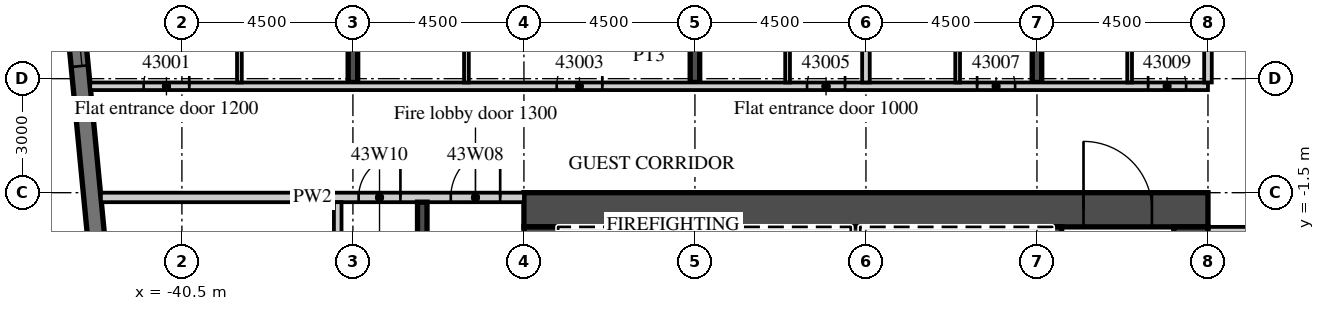
"""IFC4 building model, lengths in metres.
Left out: names, types, materials, properties, quantities, classifications, styles, units other than length and angle.
Written with IfcOpenShell. Run it as: python <this file> out.ifc"""

import sys

from ifc_helpers import new_model, si_unit, direction, frame, frame_2d, origin, place, context, subcontext, project, spatial, rectangle, extrude, element, fill, save


model = new_model("IFC4")
c1 = context("Model", 3, precision=1e-05, world=origin(), true_north=direction((0.0, 1.0)))
c2 = subcontext(c1, "Body", "Model", "MODEL_VIEW")
j1 = project(units=[si_unit("LENGTHUNIT", "METRE"), si_unit("PLANEANGLEUNIT", "RADIAN")], contexts=[c1])
p1 = place(None, origin())
s1 = spatial("IfcSite", under=j1, at=p1, CompositionType="ELEMENT")
p2 = place(p1, origin())
s2 = spatial("IfcBuilding", under=s1, at=p2, CompositionType="ELEMENT")
p3 = place(p2, frame((0.0, 0.0, 183.4)))
s3 = spatial("IfcBuildingStorey", under=s2, at=p3, CompositionType="ELEMENT", Elevation=183.4)
p4 = place(p3, frame((-36.0, 1.4, 0.0), z_axis=(0.0, 0.0, 1.0), x_axis=(0.0, 1.0, 0.0)))
e1 = element("IfcWall", 1, at=p4, inside=s3, PredefinedType="SHEAR", context=c2, shape_type="SweptSolid", body=[
    extrude(rectangle(XDim=15.401, YDim=0.25, at=frame_2d((7.701, 0.0))), origin(), (0.0, 0.0, 1.0), 3.3),
])
p5 = place(p3, frame((-27.0, 1.4, 0.0), z_axis=(0.0, 0.0, 1.0), x_axis=(0.0, 1.0, 0.0)))
e2 = element("IfcWall", 2, at=p5, inside=s3, PredefinedType="SHEAR", context=c2, shape_type="SweptSolid", body=[
    extrude(rectangle(XDim=16.268, YDim=0.25, at=frame_2d((8.134, 0.0))), origin(), (0.0, 0.0, 1.0), 3.3),
])
p6 = place(p3, frame((-18.0, 1.4, 0.0), z_axis=(0.0, 0.0, 1.0), x_axis=(0.0, 1.0, 0.0)))
e3 = element("IfcWall", 3, at=p6, inside=s3, PredefinedType="SHEAR", context=c2, shape_type="SweptSolid", body=[
    extrude(rectangle(XDim=17.134, YDim=0.25, at=frame_2d((8.567, 0.0))), origin(), (0.0, 0.0, 1.0), 3.3),
])
p7 = place(p3, frame((-44.214, 12.466, 0.0), z_axis=(0.0, 0.0, 1.0), x_axis=(0.095847314626, -0.995396047952, 0.0)))
e4 = element("IfcWall", 4, at=p7, inside=s3, PredefinedType="SOLIDWALL", context=c2, shape_type="SweptSolid", body=[
    extrude(rectangle(XDim=34.0, YDim=0.45, at=frame_2d((17.0, 0.0))), origin(), (0.0, 0.0, 1.0), 3.02),
])
p8 = place(p7, frame((2.865, 0.0, 0.45)))
e5 = element("IfcOpeningElement", 5, at=p8, cuts=e4, PredefinedType="OPENING", context=c2, shape_type="SweptSolid", body=[
    extrude(rectangle(XDim=3.3, YDim=2.25, at=frame_2d((1.65, 1.125))), frame((0.0, 0.235, 0.0), z_axis=(0.0, -1.0, 0.0), x_axis=(1.0, 0.0, 0.0)), (0.0, 0.0, 1.0), 0.47),
])
p9 = place(p7, frame((7.386, 0.0, 0.45)))
e6 = element("IfcOpeningElement", 6, at=p9, cuts=e4, PredefinedType="OPENING", context=c2, shape_type="SweptSolid", body=[
    extrude(rectangle(XDim=3.3, YDim=2.25, at=frame_2d((1.65, 1.125))), frame((0.0, 0.235, 0.0), z_axis=(0.0, -1.0, 0.0), x_axis=(1.0, 0.0, 0.0)), (0.0, 0.0, 1.0), 0.47),
])
p10 = place(p3, frame((-42.913, 1.3, 0.0), z_axis=(0.0, 0.0, 1.0), x_axis=(1.0, 0.0, 0.0)))
e7 = element("IfcWall", 7, at=p10, inside=s3, PredefinedType="PARTITIONING", context=c2, shape_type="SweptSolid", body=[
    extrude(rectangle(XDim=29.413, YDim=0.2, at=frame_2d((14.707, 0.0))), origin(), (0.0, 0.0, 1.0), 3.02),
])
p11 = place(p10, frame((1.406, 0.0, 0.0)))
e8 = element("IfcOpeningElement", 8, at=p11, cuts=e7, PredefinedType="OPENING", context=c2, shape_type="SweptSolid", body=[
    extrude(rectangle(XDim=1.2, YDim=2.1, at=frame_2d((0.6, 1.05))), frame((0.0, 0.11, 0.0), z_axis=(0.0, -1.0, 0.0), x_axis=(1.0, 0.0, 0.0)), (0.0, 0.0, 1.0), 0.22),
])
p12 = place(p10, frame((12.275, 0.0, 0.0)))
e9 = element("IfcOpeningElement", 9, at=p12, cuts=e7, PredefinedType="OPENING", context=c2, shape_type="SweptSolid", body=[
    extrude(rectangle(XDim=1.2, YDim=2.1, at=frame_2d((0.6, 1.05))), frame((0.0, 0.11, 0.0), z_axis=(0.0, -1.0, 0.0), x_axis=(1.0, 0.0, 0.0)), (0.0, 0.0, 1.0), 0.22),
])
p13 = place(p10, frame((18.863, 0.0, 0.0)))
e10 = element("IfcOpeningElement", 10, at=p13, cuts=e7, PredefinedType="OPENING", context=c2, shape_type="SweptSolid", body=[
    extrude(rectangle(XDim=1.0, YDim=2.1, at=frame_2d((0.5, 1.05))), frame((0.0, 0.11, 0.0), z_axis=(0.0, -1.0, 0.0), x_axis=(1.0, 0.0, 0.0)), (0.0, 0.0, 1.0), 0.22),
])
p14 = place(p10, frame((23.338, 0.0, 0.0)))
e11 = element("IfcOpeningElement", 11, at=p14, cuts=e7, PredefinedType="OPENING", context=c2, shape_type="SweptSolid", body=[
    extrude(rectangle(XDim=1.0, YDim=2.1, at=frame_2d((0.5, 1.05))), frame((0.0, 0.11, 0.0), z_axis=(0.0, -1.0, 0.0), x_axis=(1.0, 0.0, 0.0)), (0.0, 0.0, 1.0), 0.22),
])
p15 = place(p10, frame((27.838, 0.0, 0.0)))
e12 = element("IfcOpeningElement", 12, at=p15, cuts=e7, PredefinedType="OPENING", context=c2, shape_type="SweptSolid", body=[
    extrude(rectangle(XDim=1.0, YDim=2.1, at=frame_2d((0.5, 1.05))), frame((0.0, 0.11, 0.0), z_axis=(0.0, -1.0, 0.0), x_axis=(1.0, 0.0, 0.0)), (0.0, 0.0, 1.0), 0.22),
])
p16 = place(p3, frame((-38.987, 1.4, 0.0), z_axis=(0.0, 0.0, 1.0), x_axis=(0.0, 1.0, 0.0)))
e13 = element("IfcWall", 13, at=p16, inside=s3, PredefinedType="PARTITIONING", context=c2, shape_type="SweptSolid", body=[
    extrude(rectangle(XDim=4.028, YDim=0.125, at=frame_2d((2.014, 0.0))), origin(), (0.0, 0.0, 1.0), 3.02),
])
p17 = place(p16, frame((2.45, 0.0, 0.0)))
e14 = element("IfcOpeningElement", 14, at=p17, cuts=e13, PredefinedType="OPENING", context=c2, shape_type="SweptSolid", body=[
    extrude(rectangle(XDim=0.9, YDim=2.1, at=frame_2d((0.45, 1.05))), frame((0.0, 0.073, 0.0), z_axis=(0.0, -1.0, 0.0), x_axis=(1.0, 0.0, 0.0)), (0.0, 0.0, 1.0), 0.145),
])
p18 = place(p3, frame((-33.013, 1.4, 0.0), z_axis=(0.0, 0.0, 1.0), x_axis=(0.0, 1.0, 0.0)))
e15 = element("IfcWall", 15, at=p18, inside=s3, PredefinedType="PARTITIONING", context=c2, shape_type="SweptSolid", body=[
    extrude(rectangle(XDim=5.225, YDim=0.125, at=frame_2d((2.613, 0.0))), origin(), (0.0, 0.0, 1.0), 3.02),
])
p19 = place(p18, frame((2.45, 0.0, 0.0)))
e16 = element("IfcOpeningElement", 16, at=p19, cuts=e15, PredefinedType="OPENING", context=c2, shape_type="SweptSolid", body=[
    extrude(rectangle(XDim=0.9, YDim=2.1, at=frame_2d((0.45, 1.05))), frame((0.0, 0.073, 0.0), z_axis=(0.0, -1.0, 0.0), x_axis=(1.0, 0.0, 0.0)), (0.0, 0.0, 1.0), 0.145),
])
p20 = place(p3, frame((-22.5, 1.4, 0.0), z_axis=(0.0, 0.0, 1.0), x_axis=(0.0, 1.0, 0.0)))
e17 = element("IfcWall", 17, at=p20, inside=s3, PredefinedType="PARTITIONING", context=c2, shape_type="SweptSolid", body=[
    extrude(rectangle(XDim=16.723, YDim=0.2, at=frame_2d((8.362, 0.0))), origin(), (0.0, 0.0, 1.0), 3.02),
])
p21 = place(p3, frame((-24.562, 1.4, 0.0), z_axis=(0.0, 0.0, 1.0), x_axis=(0.0, 1.0, 0.0)))
e18 = element("IfcWall", 18, at=p21, inside=s3, PredefinedType="PARTITIONING", context=c2, shape_type="SweptSolid", body=[
    extrude(rectangle(XDim=5.225, YDim=0.125, at=frame_2d((2.613, 0.0))), origin(), (0.0, 0.0, 1.0), 3.02),
])
p22 = place(p21, frame((2.45, 0.0, 0.0)))
e19 = element("IfcOpeningElement", 19, at=p22, cuts=e18, PredefinedType="OPENING", context=c2, shape_type="SweptSolid", body=[
    extrude(rectangle(XDim=0.9, YDim=2.1, at=frame_2d((0.45, 1.05))), frame((0.0, 0.073, 0.0), z_axis=(0.0, -1.0, 0.0), x_axis=(1.0, 0.0, 0.0)), (0.0, 0.0, 1.0), 0.145),
])
p23 = place(p3, frame((-20.087, 1.4, 0.0), z_axis=(0.0, 0.0, 1.0), x_axis=(0.0, 1.0, 0.0)))
e20 = element("IfcWall", 20, at=p23, inside=s3, PredefinedType="PARTITIONING", context=c2, shape_type="SweptSolid", body=[
    extrude(rectangle(XDim=5.225, YDim=0.125, at=frame_2d((2.613, 0.0))), origin(), (0.0, 0.0, 1.0), 3.02),
])
p24 = place(p23, frame((2.45, 0.0, 0.0)))
e21 = element("IfcOpeningElement", 21, at=p24, cuts=e20, PredefinedType="OPENING", context=c2, shape_type="SweptSolid", body=[
    extrude(rectangle(XDim=0.9, YDim=2.1, at=frame_2d((0.45, 1.05))), frame((0.0, 0.073, 0.0), z_axis=(0.0, -1.0, 0.0), x_axis=(1.0, 0.0, 0.0)), (0.0, 0.0, 1.0), 0.145),
])
p25 = place(p3, frame((-13.5, 1.4, 0.0), z_axis=(0.0, 0.0, 1.0), x_axis=(0.0, 1.0, 0.0)))
e22 = element("IfcWall", 22, at=p25, inside=s3, PredefinedType="PARTITIONING", context=c2, shape_type="SweptSolid", body=[
    extrude(rectangle(XDim=17.59, YDim=0.2, at=frame_2d((8.795, 0.0))), origin(), (0.0, 0.0, 1.0), 3.02),
])
p26 = place(p3, frame((-15.562, 1.4, 0.0), z_axis=(0.0, 0.0, 1.0), x_axis=(0.0, 1.0, 0.0)))
e23 = element("IfcWall", 23, at=p26, inside=s3, PredefinedType="PARTITIONING", context=c2, shape_type="SweptSolid", body=[
    extrude(rectangle(XDim=5.225, YDim=0.125, at=frame_2d((2.613, 0.0))), origin(), (0.0, 0.0, 1.0), 3.02),
])
p27 = place(p26, frame((2.45, 0.0, 0.0)))
e24 = element("IfcOpeningElement", 24, at=p27, cuts=e23, PredefinedType="OPENING", context=c2, shape_type="SweptSolid", body=[
    extrude(rectangle(XDim=0.9, YDim=2.1, at=frame_2d((0.45, 1.05))), frame((0.0, 0.073, 0.0), z_axis=(0.0, -1.0, 0.0), x_axis=(1.0, 0.0, 0.0)), (0.0, 0.0, 1.0), 0.145),
])
p28 = place(p3, frame((-13.5, -2.5, 0.0), z_axis=(0.0, 0.0, 1.0), x_axis=(1.0, 0.0, 0.0)))
e25 = element("IfcWall", 25, at=p28, inside=s3, PredefinedType="PARTITIONING", context=c2, shape_type="SweptSolid", body=[
    extrude(rectangle(XDim=27.0, YDim=0.2, at=frame_2d((13.5, 0.0))), origin(), (0.0, 0.0, 1.0), 3.02),
])
p29 = place(p28, frame((2.925, 0.0, 0.0)))
e26 = element("IfcOpeningElement", 26, at=p29, cuts=e25, PredefinedType="OPENING", context=c2, shape_type="SweptSolid", body=[
    extrude(rectangle(XDim=1.0, YDim=2.1, at=frame_2d((0.5, 1.05))), frame((0.0, 0.11, 0.0), z_axis=(0.0, -1.0, 0.0), x_axis=(1.0, 0.0, 0.0)), (0.0, 0.0, 1.0), 0.22),
])
p30 = place(p28, frame((7.45, 0.0, 0.0)))
e27 = element("IfcOpeningElement", 27, at=p30, cuts=e25, PredefinedType="OPENING", context=c2, shape_type="SweptSolid", body=[
    extrude(rectangle(XDim=1.0, YDim=2.1, at=frame_2d((0.5, 1.05))), frame((0.0, 0.11, 0.0), z_axis=(0.0, -1.0, 0.0), x_axis=(1.0, 0.0, 0.0)), (0.0, 0.0, 1.0), 0.22),
])
p31 = place(p28, frame((11.925, 0.0, 0.0)))
e28 = element("IfcOpeningElement", 28, at=p31, cuts=e25, PredefinedType="OPENING", context=c2, shape_type="SweptSolid", body=[
    extrude(rectangle(XDim=1.0, YDim=2.1, at=frame_2d((0.5, 1.05))), frame((0.0, 0.11, 0.0), z_axis=(0.0, -1.0, 0.0), x_axis=(1.0, 0.0, 0.0)), (0.0, 0.0, 1.0), 0.22),
])
p32 = place(p28, frame((18.862, 0.0, 0.0)))
e29 = element("IfcOpeningElement", 29, at=p32, cuts=e25, PredefinedType="OPENING", context=c2, shape_type="SweptSolid", body=[
    extrude(rectangle(XDim=1.2, YDim=2.1, at=frame_2d((0.6, 1.05))), frame((0.0, 0.11, 0.0), z_axis=(0.0, -1.0, 0.0), x_axis=(1.0, 0.0, 0.0)), (0.0, 0.0, 1.0), 0.22),
])
p33 = place(p28, frame((25.425, 0.0, 0.0)))
e30 = element("IfcOpeningElement", 30, at=p33, cuts=e25, PredefinedType="OPENING", context=c2, shape_type="SweptSolid", body=[
    extrude(rectangle(XDim=1.0, YDim=2.1, at=frame_2d((0.5, 1.05))), frame((0.0, 0.11, 0.0), z_axis=(0.0, -1.0, 0.0), x_axis=(1.0, 0.0, 0.0)), (0.0, 0.0, 1.0), 0.22),
])
p34 = place(p3, frame((-31.5, -1.95, 0.0), z_axis=(0.0, 0.0, 1.0), x_axis=(1.0, 0.0, 0.0)))
e31 = element("IfcWall", 31, at=p34, inside=s3, PredefinedType="SHEAR", context=c2, shape_type="SweptSolid", body=[
    extrude(rectangle(XDim=18.0, YDim=0.9, at=frame_2d((9.0, 0.0))), origin(), (0.0, 0.0, 1.0), 3.02),
])
p35 = place(p34, frame((14.725, 0.0, 0.0)))
e32 = element("IfcOpeningElement", 32, at=p35, cuts=e31, PredefinedType="OPENING", context=c2, shape_type="SweptSolid", body=[
    extrude(rectangle(XDim=1.8, YDim=2.1, at=frame_2d((0.9, 1.05))), frame((0.0, 0.46, 0.0), z_axis=(0.0, -1.0, 0.0), x_axis=(1.0, 0.0, 0.0)), (0.0, 0.0, 1.0), 0.92),
])
p36 = place(p3, frame((-31.05, -15.2, 0.0), z_axis=(0.0, 0.0, 1.0), x_axis=(0.0, 1.0, 0.0)))
e33 = element("IfcWall", 33, at=p36, inside=s3, PredefinedType="SHEAR", context=c2, shape_type="SweptSolid", body=[
    extrude(rectangle(XDim=12.8, YDim=0.9, at=frame_2d((6.4, 0.0))), origin(), (0.0, 0.0, 1.0), 3.02),
])
p37 = place(p36, frame((11.5, 0.0, 0.0)))
e34 = element("IfcOpeningElement", 34, at=p37, cuts=e33, PredefinedType="OPENING", context=c2, shape_type="SweptSolid", body=[
    extrude(rectangle(XDim=1.1, YDim=2.1, at=frame_2d((0.55, 1.05))), frame((0.0, 0.46, 0.0), z_axis=(0.0, -1.0, 0.0), x_axis=(1.0, 0.0, 0.0)), (0.0, 0.0, 1.0), 0.92),
])
p38 = place(p3, frame((-13.95, -14.6, 0.0), z_axis=(0.0, 0.0, 1.0), x_axis=(0.0, 1.0, 0.0)))
e35 = element("IfcWall", 35, at=p38, inside=s3, PredefinedType="SHEAR", context=c2, shape_type="SweptSolid", body=[
    extrude(rectangle(XDim=12.2, YDim=0.9, at=frame_2d((6.1, 0.0))), origin(), (0.0, 0.0, 1.0), 3.02),
])
p39 = place(p3, frame((-17.475, -5.55, 0.0), z_axis=(0.0, 0.0, 1.0), x_axis=(0.0, 1.0, 0.0)))
e36 = element("IfcWall", 36, at=p39, inside=s3, PredefinedType="SHEAR", context=c2, shape_type="SweptSolid", body=[
    extrude(rectangle(XDim=3.15, YDim=0.25, at=frame_2d((1.575, 0.0))), origin(), (0.0, 0.0, 1.0), 3.02),
])
for number, where, z_axis, x_axis in (
    (37, (-27.975, -5.3, 0.0), (0.0, 0.0, 1.0), (0.0, 1.0, 0.0)),
    (38, (-22.775, -5.3, 0.0), (0.0, 0.0, 1.0), (0.0, 1.0, 0.0)),
):
    element("IfcWall", number, at=place(p3, frame(where, z_axis=z_axis, x_axis=x_axis)), inside=s3, PredefinedType="SHEAR", context=c2, shape_type="SweptSolid", body=[
        extrude(rectangle(XDim=2.9, YDim=0.25, at=frame_2d((1.45, 0.0))), origin(), (0.0, 0.0, 1.0), 3.02),
    ])
p40 = place(p3, frame((-42.632, -1.625, 0.0), z_axis=(0.0, 0.0, 1.0), x_axis=(1.0, 0.0, 0.0)))
e39 = element("IfcWall", 39, at=p40, inside=s3, PredefinedType="PARTITIONING", context=c2, shape_type="SweptSolid", body=[
    extrude(rectangle(XDim=11.132, YDim=0.25, at=frame_2d((5.566, 0.0))), origin(), (0.0, 0.0, 1.0), 3.02),
])
p41 = place(p40, frame((9.207, 0.0, 0.0)))
e40 = element("IfcOpeningElement", 40, at=p41, cuts=e39, PredefinedType="OPENING", context=c2, shape_type="SweptSolid", body=[
    extrude(rectangle(XDim=1.3, YDim=2.1, at=frame_2d((0.65, 1.05))), frame((0.0, 0.135, 0.0), z_axis=(0.0, -1.0, 0.0), x_axis=(1.0, 0.0, 0.0)), (0.0, 0.0, 1.0), 0.27),
])
p42 = place(p40, frame((6.781, 0.0, 0.0)))
e41 = element("IfcOpeningElement", 41, at=p42, cuts=e39, PredefinedType="OPENING", context=c2, shape_type="SweptSolid", body=[
    extrude(rectangle(XDim=1.1, YDim=2.1, at=frame_2d((0.55, 1.05))), frame((0.0, 0.135, 0.0), z_axis=(0.0, -1.0, 0.0), x_axis=(1.0, 0.0, 0.0)), (0.0, 0.0, 1.0), 0.27),
])
p43 = place(p3, frame((-34.175, -10.1, 0.0), z_axis=(0.0, 0.0, 1.0), x_axis=(0.0, 1.0, 0.0)))
e42 = element("IfcWall", 42, at=p43, inside=s3, PredefinedType="SHEAR", context=c2, shape_type="SweptSolid", body=[
    extrude(rectangle(XDim=8.35, YDim=0.25, at=frame_2d((4.175, 0.0))), origin(), (0.0, 0.0, 1.0), 3.02),
])
p44 = place(p3, frame((-36.4, -17.7, 0.0), z_axis=(0.0, 0.0, 1.0), x_axis=(0.0, 1.0, 0.0)))
e43 = element("IfcWall", 43, at=p44, inside=s3, PredefinedType="PARTITIONING", context=c2, shape_type="SweptSolid", body=[
    extrude(rectangle(XDim=15.95, YDim=0.2, at=frame_2d((7.975, 0.0))), origin(), (0.0, 0.0, 1.0), 3.02),
])
p45 = place(p44, frame((0.35, 0.0, 0.0)))
e44 = element("IfcOpeningElement", 44, at=p45, cuts=e43, PredefinedType="OPENING", context=c2, shape_type="SweptSolid", body=[
    extrude(rectangle(XDim=0.9, YDim=2.1, at=frame_2d((0.45, 1.05))), frame((0.0, 0.11, 0.0), z_axis=(0.0, -1.0, 0.0), x_axis=(1.0, 0.0, 0.0)), (0.0, 0.0, 1.0), 0.22),
])
p46 = place(p9, origin())
e45 = element("IfcWindow", 45, at=p46, inside=s3, PartitioningType="SINGLE_PANEL", PredefinedType="WINDOW", context=c2, shape_type="SweptSolid", body=[
    extrude(rectangle(XDim=3.3, YDim=2.25, at=frame_2d((1.65, 1.125))), frame((0.0, 0.09, 0.0), z_axis=(0.0, -1.0, 0.0), x_axis=(1.0, 0.0, 0.0)), (0.0, 0.0, 1.0), 0.06),
])
fill(e6, e45)
p47 = place(p11, origin())
e46 = element("IfcDoor", 46, at=p47, inside=s3, OperationType="SINGLE_SWING_RIGHT", PredefinedType="DOOR", context=c2, shape_type="SweptSolid", body=[
    extrude(rectangle(XDim=1.2, YDim=2.1, at=frame_2d((0.6, 1.05))), frame((0.0, 0.025, 0.0), z_axis=(0.0, -1.0, 0.0), x_axis=(1.0, 0.0, 0.0)), (0.0, 0.0, 1.0), 0.05),
])
fill(e8, e46)
p48 = place(p12, origin())
e47 = element("IfcDoor", 47, at=p48, inside=s3, OperationType="SINGLE_SWING_RIGHT", PredefinedType="DOOR", context=c2, shape_type="SweptSolid", body=[
    extrude(rectangle(XDim=1.2, YDim=2.1, at=frame_2d((0.6, 1.05))), frame((0.0, 0.025, 0.0), z_axis=(0.0, -1.0, 0.0), x_axis=(1.0, 0.0, 0.0)), (0.0, 0.0, 1.0), 0.05),
])
fill(e9, e47)
p49 = place(p13, origin())
e48 = element("IfcDoor", 48, at=p49, inside=s3, OperationType="SINGLE_SWING_RIGHT", PredefinedType="DOOR", context=c2, shape_type="SweptSolid", body=[
    extrude(rectangle(XDim=1.0, YDim=2.1, at=frame_2d((0.5, 1.05))), frame((0.0, 0.025, 0.0), z_axis=(0.0, -1.0, 0.0), x_axis=(1.0, 0.0, 0.0)), (0.0, 0.0, 1.0), 0.05),
])
fill(e10, e48)
p50 = place(p14, origin())
e49 = element("IfcDoor", 49, at=p50, inside=s3, OperationType="SINGLE_SWING_LEFT", PredefinedType="DOOR", context=c2, shape_type="SweptSolid", body=[
    extrude(rectangle(XDim=1.0, YDim=2.1, at=frame_2d((0.5, 1.05))), frame((0.0, 0.025, 0.0), z_axis=(0.0, -1.0, 0.0), x_axis=(1.0, 0.0, 0.0)), (0.0, 0.0, 1.0), 0.05),
])
fill(e11, e49)
p51 = place(p15, origin())
e50 = element("IfcDoor", 50, at=p51, inside=s3, OperationType="SINGLE_SWING_LEFT", PredefinedType="DOOR", context=c2, shape_type="SweptSolid", body=[
    extrude(rectangle(XDim=1.0, YDim=2.1, at=frame_2d((0.5, 1.05))), frame((0.0, 0.025, 0.0), z_axis=(0.0, -1.0, 0.0), x_axis=(1.0, 0.0, 0.0)), (0.0, 0.0, 1.0), 0.05),
])
fill(e12, e50)
p52 = place(p35, origin())
e51 = element("IfcDoor", 51, at=p52, inside=s3, OperationType="DOUBLE_DOOR_DOUBLE_SWING", PredefinedType="DOOR", context=c2, shape_type="SweptSolid", body=[
    extrude(rectangle(XDim=1.8, YDim=2.1, at=frame_2d((0.9, 1.05))), frame((0.0, 0.025, 0.0), z_axis=(0.0, -1.0, 0.0), x_axis=(1.0, 0.0, 0.0)), (0.0, 0.0, 1.0), 0.05),
])
fill(e32, e51)
p53 = place(p41, origin())
e52 = element("IfcDoor", 52, at=p53, inside=s3, OperationType="SINGLE_SWING_RIGHT", PredefinedType="DOOR", context=c2, shape_type="SweptSolid", body=[
    extrude(rectangle(XDim=1.3, YDim=2.1, at=frame_2d((0.65, 1.05))), frame((0.0, 0.025, 0.0), z_axis=(0.0, -1.0, 0.0), x_axis=(1.0, 0.0, 0.0)), (0.0, 0.0, 1.0), 0.05),
])
fill(e40, e52)
p54 = place(p42, origin())
e53 = element("IfcDoor", 53, at=p54, inside=s3, OperationType="SINGLE_SWING_RIGHT", PredefinedType="DOOR", context=c2, shape_type="SweptSolid", body=[
    extrude(rectangle(XDim=1.1, YDim=2.1, at=frame_2d((0.55, 1.05))), frame((0.0, 0.025, 0.0), z_axis=(0.0, -1.0, 0.0), x_axis=(1.0, 0.0, 0.0)), (0.0, 0.0, 1.0), 0.05),
])
fill(e41, e53)
save(model, sys.argv[1])
